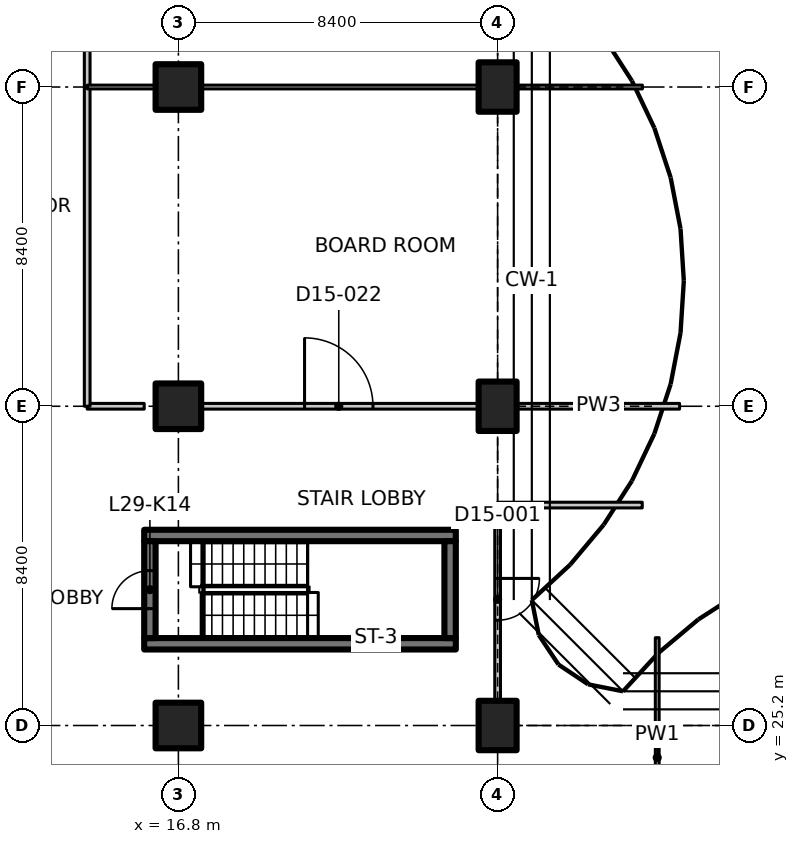
"""IFC4 building model, lengths in metres.
Left out: names, types, materials, properties, quantities, classifications, styles, units other than length and angle.
Written with IfcOpenShell. Run it as: python <this file> out.ifc"""

import sys

from ifc_helpers import new_model, si_unit, direction, frame, frame_2d, origin, origin_2d, place, context, subcontext, project, spatial, polyline, rectangle, outline, extrude, element, fill, save


model = new_model("IFC4")
c1 = context("Model", 3, precision=1e-05, world=origin(), true_north=direction((0.0, 1.0)))
c2 = subcontext(c1, "Body", "Model", "MODEL_VIEW")
j1 = project(units=[si_unit("LENGTHUNIT", "METRE"), si_unit("PLANEANGLEUNIT", "RADIAN")], contexts=[c1])
p1 = place(None, origin())
s1 = spatial("IfcSite", under=j1, at=p1, CompositionType="ELEMENT")
p2 = place(p1, origin())
s2 = spatial("IfcBuilding", under=s1, at=p2, CompositionType="ELEMENT")
p3 = place(p2, frame((0.0, 0.0, 120.5)))
s3 = spatial("IfcBuildingStorey", under=s2, at=p3, CompositionType="ELEMENT", Elevation=120.5)
for number, where, z_axis, x_axis in (
    (1, (16.8, 25.2, 0.0), (0.0, 0.0, 1.0), (1.0, 0.0, 0.0)),
    (2, (16.8, 33.6, 0.0), (0.0, 0.0, 1.0), (1.0, 0.0, 0.0)),
    (3, (16.8, 42.0, 0.0), (0.0, 0.0, 1.0), (1.0, 0.0, 0.0)),
):
    element("IfcColumn", number, at=place(p3, frame(where, z_axis=z_axis, x_axis=x_axis)), inside=s3, PredefinedType="COLUMN", context=c2, shape_type="SweptSolid", body=[
        extrude(rectangle(XDim=1.2, YDim=1.2, at=origin_2d()), origin(), (0.0, 0.0, 1.0), 3.35),
    ])
for number, where, z_axis, x_axis in (
    (4, (25.2, 25.2, 0.0), (0.0, 0.0, 1.0), (1.0, 0.0, 0.0)),
    (5, (25.2, 33.6, 0.0), (0.0, 0.0, 1.0), (1.0, 0.0, 0.0)),
    (6, (25.2, 42.0, 0.0), (0.0, 0.0, 1.0), (1.0, 0.0, 0.0)),
):
    element("IfcColumn", number, at=place(p3, frame(where, z_axis=z_axis, x_axis=x_axis)), inside=s3, PredefinedType="COLUMN", context=c2, shape_type="SweptSolid", body=[
        extrude(rectangle(XDim=1.0, YDim=1.3, at=origin_2d()), origin(), (0.0, 0.0, 1.0), 3.35),
    ])
for number, where, z_axis, x_axis in (
    (7, (15.9, 27.35, 0.0), (0.0, 0.0, 1.0), (1.0, 0.0, 0.0)),
    (8, (15.9, 30.2, 0.0), (0.0, 0.0, 1.0), (1.0, 0.0, 0.0)),
):
    element("IfcWall", number, at=place(p3, frame(where, z_axis=z_axis, x_axis=x_axis)), inside=s3, PredefinedType="SHEAR", context=c2, shape_type="SweptSolid", body=[
        extrude(rectangle(XDim=8.2, YDim=0.3, at=frame_2d((4.1, 0.0))), origin(), (0.0, 0.0, 1.0), 3.35),
    ])
p4 = place(p3, frame((16.05, 27.5, 0.0), z_axis=(0.0, 0.0, 1.0), x_axis=(0.0, 1.0, 0.0)))
e9 = element("IfcWall", 9, at=p4, inside=s3, PredefinedType="SHEAR", context=c2, shape_type="SweptSolid", body=[
    extrude(rectangle(XDim=2.55, YDim=0.3, at=frame_2d((1.275, 0.0))), origin(), (0.0, 0.0, 1.0), 3.35),
])
p5 = place(p4, frame((0.775, 0.0, 0.0)))
e10 = element("IfcOpeningElement", 10, at=p5, cuts=e9, PredefinedType="OPENING", context=c2, shape_type="SweptSolid", body=[
    extrude(rectangle(XDim=1.0, YDim=2.1, at=frame_2d((0.5, 1.05))), frame((0.0, 0.16, 0.0), z_axis=(0.0, -1.0, 0.0), x_axis=(1.0, 0.0, 0.0)), (0.0, 0.0, 1.0), 0.32),
])
p6 = place(p3, frame((23.95, 27.5, 0.0), z_axis=(0.0, 0.0, 1.0), x_axis=(0.0, 1.0, 0.0)))
e11 = element("IfcWall", 11, at=p6, inside=s3, PredefinedType="SHEAR", context=c2, shape_type="SweptSolid", body=[
    extrude(rectangle(XDim=2.55, YDim=0.3, at=frame_2d((1.275, 0.0))), origin(), (0.0, 0.0, 1.0), 3.35),
])
p7 = place(p3, frame((29.4, 27.511, 0.0), z_axis=(0.0, 0.0, 1.0), x_axis=(0.0, -1.0, 0.0)))
e12 = element("IfcWall", 12, at=p7, inside=s3, PredefinedType="PARTITIONING", context=c2, shape_type="SweptSolid", body=[
    extrude(outline(polyline([(0.0, 0.0), (6.311, 0.0), (6.311, 3.33), (2.761, 3.33), (2.759, 2.98), (1.863, 2.98), (1.861, 3.33), (0.236, 3.33), (0.0, 3.33), (0.0, 0.0)])), frame((0.0, 0.05, 0.0), z_axis=(0.0, -1.0, 0.0), x_axis=(1.0, 0.0, 0.0)), (0.0, 0.0, 1.0), 0.1),
])
p8 = place(p3, frame((25.2, 31.0, 0.0), z_axis=(0.0, 0.0, 1.0), x_axis=(0.0, -1.0, 0.0)))
e13 = element("IfcWall", 13, at=p8, inside=s3, PredefinedType="PARTITIONING", context=c2, shape_type="SweptSolid", body=[
    extrude(outline(polyline([(0.0, 0.0), (5.13, 0.0), (5.13, 2.98), (0.0, 2.98), (0.0, 0.0)])), frame((0.0, 0.075, 0.0), z_axis=(0.0, -1.0, 0.0), x_axis=(1.0, 0.0, 0.0)), (0.0, 0.0, 1.0), 0.15),
])
p9 = place(p8, frame((1.93, 0.0, 0.0)))
e14 = element("IfcOpeningElement", 14, at=p9, cuts=e13, PredefinedType="OPENING", context=c2, shape_type="SweptSolid", body=[
    extrude(rectangle(XDim=1.1, YDim=2.1, at=frame_2d((0.55, 1.05))), frame((0.0, 0.085, 0.0), z_axis=(0.0, -1.0, 0.0), x_axis=(1.0, 0.0, 0.0)), (0.0, 0.0, 1.0), 0.17),
])
p10 = place(p3, frame((25.2, 31.0, 0.0), z_axis=(0.0, 0.0, 1.0), x_axis=(1.0, 0.0, 0.0)))
e15 = element("IfcWall", 15, at=p10, inside=s3, PredefinedType="PARTITIONING", context=c2, shape_type="SweptSolid", body=[
    extrude(rectangle(XDim=3.806, YDim=0.15, at=frame_2d((1.903, 0.0))), origin(), (0.0, 0.0, 1.0), 2.98),
])
p11 = place(p3, frame((14.4, 33.6, 0.0), z_axis=(0.0, 0.0, 1.0), x_axis=(1.0, 0.0, 0.0)))
e16 = element("IfcWall", 16, at=p11, inside=s3, PredefinedType="PARTITIONING", context=c2, shape_type="SweptSolid", body=[
    extrude(rectangle(XDim=1.5, YDim=0.15, at=frame_2d((0.75, 0.0))), origin(), (0.0, 0.0, 1.0), 3.33),
])
p12 = place(p3, frame((17.42, 33.6, 0.0), z_axis=(0.0, 0.0, 1.0), x_axis=(1.0, 0.0, 0.0)))
e17 = element("IfcWall", 17, at=p12, inside=s3, PredefinedType="PARTITIONING", context=c2, shape_type="SweptSolid", body=[
    extrude(rectangle(XDim=7.26, YDim=0.15, at=frame_2d((3.63, 0.0))), origin(), (0.0, 0.0, 1.0), 3.33),
])
p13 = place(p12, frame((2.7, 0.0, 0.0)))
e18 = element("IfcOpeningElement", 18, at=p13, cuts=e17, PredefinedType="OPENING", context=c2, shape_type="SweptSolid", body=[
    extrude(rectangle(XDim=1.8, YDim=2.1, at=frame_2d((0.9, 1.05))), frame((0.0, 0.085, 0.0), z_axis=(0.0, -1.0, 0.0), x_axis=(1.0, 0.0, 0.0)), (0.0, 0.0, 1.0), 0.17),
])
p14 = place(p3, frame((25.72, 33.6, 0.0), z_axis=(0.0, 0.0, 1.0), x_axis=(1.0, 0.0, 0.0)))
e19 = element("IfcWall", 19, at=p14, inside=s3, PredefinedType="PARTITIONING", context=c2, shape_type="SweptSolid", body=[
    extrude(rectangle(XDim=4.268, YDim=0.15, at=frame_2d((2.134, 0.0))), origin(), (0.0, 0.0, 1.0), 2.98),
])
p15 = place(p3, frame((14.4, 42.0, 0.0), z_axis=(0.0, 0.0, 1.0), x_axis=(0.0, -1.0, 0.0)))
e20 = element("IfcWall", 20, at=p15, inside=s3, PredefinedType="PARTITIONING", context=c2, shape_type="SweptSolid", body=[
    extrude(rectangle(XDim=8.4, YDim=0.15, at=frame_2d((4.2, 0.0))), origin(), (0.0, 0.0, 1.0), 3.33),
])
p16 = place(p3, frame((14.4, 50.4, 0.0), z_axis=(0.0, 0.0, 1.0), x_axis=(0.0, -1.0, 0.0)))
e21 = element("IfcWall", 21, at=p16, inside=s3, PredefinedType="PARTITIONING", context=c2, shape_type="SweptSolid", body=[
    extrude(rectangle(XDim=8.4, YDim=0.15, at=frame_2d((4.2, 0.0))), origin(), (0.0, 0.0, 1.0), 3.33),
])
p17 = place(p16, frame((3.3, 0.0, 0.0)))
e22 = element("IfcOpeningElement", 22, at=p17, cuts=e21, PredefinedType="OPENING", context=c2, shape_type="SweptSolid", body=[
    extrude(rectangle(XDim=1.6, YDim=2.1, at=frame_2d((0.8, 1.05))), frame((0.0, 0.085, 0.0), z_axis=(0.0, -1.0, 0.0), x_axis=(1.0, 0.0, 0.0)), (0.0, 0.0, 1.0), 0.17),
])
p18 = place(p3, frame((14.4, 42.0, 0.0), z_axis=(0.0, 0.0, 1.0), x_axis=(1.0, 0.0, 0.0)))
e23 = element("IfcWall", 23, at=p18, inside=s3, PredefinedType="PARTITIONING", context=c2, shape_type="SweptSolid", body=[
    extrude(rectangle(XDim=1.78, YDim=0.1, at=frame_2d((0.89, 0.0))), origin(), (0.0, 0.0, 1.0), 3.33),
])
p19 = place(p3, frame((17.42, 42.0, 0.0), z_axis=(0.0, 0.0, 1.0), x_axis=(1.0, 0.0, 0.0)))
e24 = element("IfcWall", 24, at=p19, inside=s3, PredefinedType="PARTITIONING", context=c2, shape_type="SweptSolid", body=[
    extrude(rectangle(XDim=7.26, YDim=0.1, at=frame_2d((3.63, 0.0))), origin(), (0.0, 0.0, 1.0), 3.33),
])
p20 = place(p3, frame((25.72, 42.0, 0.0), z_axis=(0.0, 0.0, 1.0), x_axis=(1.0, 0.0, 0.0)))
e25 = element("IfcWall", 25, at=p20, inside=s3, PredefinedType="PARTITIONING", context=c2, shape_type="SweptSolid", body=[
    extrude(rectangle(XDim=3.292, YDim=0.1, at=frame_2d((1.646, 0.0))), origin(), (0.0, 0.0, 1.0), 2.98),
])
p21 = place(p5, origin())
e26 = element("IfcDoor", 26, at=p21, inside=s3, OperationType="SINGLE_SWING_LEFT", PredefinedType="DOOR", context=c2, shape_type="SweptSolid", body=[
    extrude(rectangle(XDim=1.0, YDim=2.1, at=frame_2d((0.5, 1.05))), frame((0.0, 0.025, 0.0), z_axis=(0.0, -1.0, 0.0), x_axis=(1.0, 0.0, 0.0)), (0.0, 0.0, 1.0), 0.05),
])
fill(e10, e26)
p22 = place(p9, origin())
e27 = element("IfcDoor", 27, at=p22, inside=s3, OperationType="SINGLE_SWING_RIGHT", PredefinedType="DOOR", context=c2, shape_type="SweptSolid", body=[
    extrude(rectangle(XDim=1.1, YDim=2.1, at=frame_2d((0.55, 1.05))), frame((0.0, 0.025, 0.0), z_axis=(0.0, -1.0, 0.0), x_axis=(1.0, 0.0, 0.0)), (0.0, 0.0, 1.0), 0.05),
])
fill(e14, e27)
p23 = place(p13, origin())
e28 = element("IfcDoor", 28, at=p23, inside=s3, OperationType="DOUBLE_DOOR_SINGLE_SWING", PredefinedType="DOOR", context=c2, shape_type="SweptSolid", body=[
    extrude(rectangle(XDim=1.8, YDim=2.1, at=frame_2d((0.9, 1.05))), frame((0.0, 0.025, 0.0), z_axis=(0.0, -1.0, 0.0), x_axis=(1.0, 0.0, 0.0)), (0.0, 0.0, 1.0), 0.05),
])
fill(e18, e28)
save(model, sys.argv[1])
